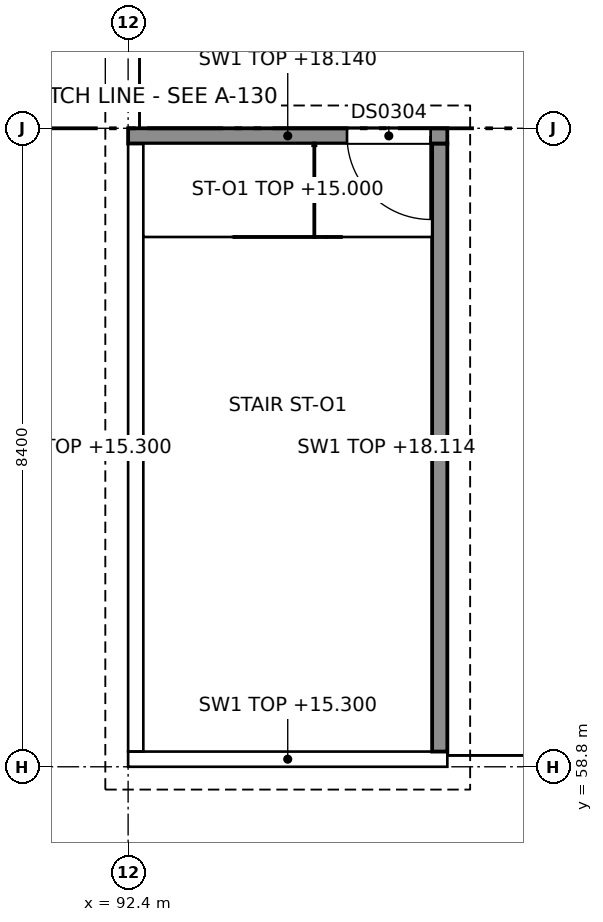
"""IFC4 building model, lengths in metres.
Left out: names, types, materials, properties, quantities, classifications, styles, units other than length and angle.
Written with IfcOpenShell. Run it as: python <this file> out.ifc"""

import sys

from ifc_helpers import new_model, si_unit, direction, frame, frame_2d, origin, place, context, subcontext, project, spatial, polyline, rectangle, outline, extrude, element, fill, save


model = new_model("IFC4")
c1 = context("Model", 3, precision=1e-05, world=origin(), true_north=direction((0.0, 1.0)))
c2 = subcontext(c1, "Body", "Model", "MODEL_VIEW")
j1 = project(units=[si_unit("LENGTHUNIT", "METRE"), si_unit("PLANEANGLEUNIT", "RADIAN")], contexts=[c1])
p1 = place(None, origin())
s1 = spatial("IfcSite", under=j1, at=p1, CompositionType="ELEMENT")
p2 = place(p1, origin())
s2 = spatial("IfcBuilding", under=s1, at=p2, CompositionType="ELEMENT")
p3 = place(p2, frame((0.0, 0.0, 15.0)))
s3 = spatial("IfcBuildingStorey", under=s2, at=p3, CompositionType="ELEMENT", Elevation=15.0)
p4 = place(p3, frame((92.4, 58.9, 0.0), z_axis=(0.0, 0.0, 1.0), x_axis=(1.0, 0.0, 0.0)))
e1 = element("IfcWall", 1, at=p4, inside=s3, PredefinedType="SHEAR", context=c2, shape_type="SweptSolid", body=[
    extrude(outline(polyline([(0.0, 0.0), (4.2, 0.0), (4.2, 0.3), (0.0, 0.3), (0.0, 0.0)])), frame((0.0, 0.1, 0.0), z_axis=(0.0, -1.0, 0.0), x_axis=(1.0, 0.0, 0.0)), (0.0, 0.0, 1.0), 0.2),
])
p5 = place(p3, frame((92.4, 67.1, 0.0), z_axis=(0.0, 0.0, 1.0), x_axis=(1.0, 0.0, 0.0)))
e2 = element("IfcWall", 2, at=p5, inside=s3, PredefinedType="SHEAR", context=c2, shape_type="SweptSolid", body=[
    extrude(outline(polyline([(0.0, 0.0), (4.2, 0.0), (4.2, 3.14), (3.953, 2.755), (3.706, 2.755), (3.459, 2.917), (0.247, 0.393), (0.0, 0.3), (0.0, 0.0)])), frame((0.0, 0.1, 0.0), z_axis=(0.0, -1.0, 0.0), x_axis=(1.0, 0.0, 0.0)), (0.0, 0.0, 1.0), 0.2),
])
p6 = place(p5, frame((2.88, 0.0, 0.0)))
e3 = element("IfcOpeningElement", 3, at=p6, cuts=e2, PredefinedType="OPENING", context=c2, shape_type="SweptSolid", body=[
    extrude(rectangle(XDim=1.1, YDim=2.1, at=frame_2d((0.55, 1.05))), frame((0.0, 0.1, 0.0), z_axis=(0.0, -1.0, 0.0), x_axis=(1.0, 0.0, 0.0)), (0.0, 0.0, 1.0), 0.2),
])
p7 = place(p3, frame((92.5, 59.0, 0.0), z_axis=(0.0, 0.0, 1.0), x_axis=(0.0, 1.0, 0.0)))
e4 = element("IfcWall", 4, at=p7, inside=s3, PredefinedType="SHEAR", context=c2, shape_type="SweptSolid", body=[
    extrude(outline(polyline([(0.0, 0.0), (8.0, 0.0), (8.0, 0.3), (0.0, 0.3), (0.0, 0.0)])), frame((0.0, 0.1, 0.0), z_axis=(0.0, -1.0, 0.0), x_axis=(1.0, 0.0, 0.0)), (0.0, 0.0, 1.0), 0.2),
])
p8 = place(p3, frame((96.5, 59.0, 0.0), z_axis=(0.0, 0.0, 1.0), x_axis=(0.0, 1.0, 0.0)))
e5 = element("IfcWall", 5, at=p8, inside=s3, PredefinedType="SHEAR", context=c2, shape_type="SweptSolid", body=[
    extrude(outline(polyline([(0.0, 0.0), (8.0, 0.0), (8.0, 3.114), (4.25, 3.114), (4.0, 2.792), (3.75, 2.755), (3.5, 2.755), (3.25, 2.91), (0.0, 0.356), (0.0, 0.0)])), frame((0.0, 0.1, 0.0), z_axis=(0.0, -1.0, 0.0), x_axis=(1.0, 0.0, 0.0)), (0.0, 0.0, 1.0), 0.2),
])
p9 = place(p6, origin())
e6 = element("IfcDoor", 6, at=p9, inside=s3, OperationType="SINGLE_SWING_RIGHT", PredefinedType="DOOR", context=c2, shape_type="SweptSolid", body=[
    extrude(rectangle(XDim=1.1, YDim=2.1, at=frame_2d((0.55, 1.05))), frame((0.0, 0.025, 0.0), z_axis=(0.0, -1.0, 0.0), x_axis=(1.0, 0.0, 0.0)), (0.0, 0.0, 1.0), 0.05),
])
fill(e3, e6)
save(model, sys.argv[1])
